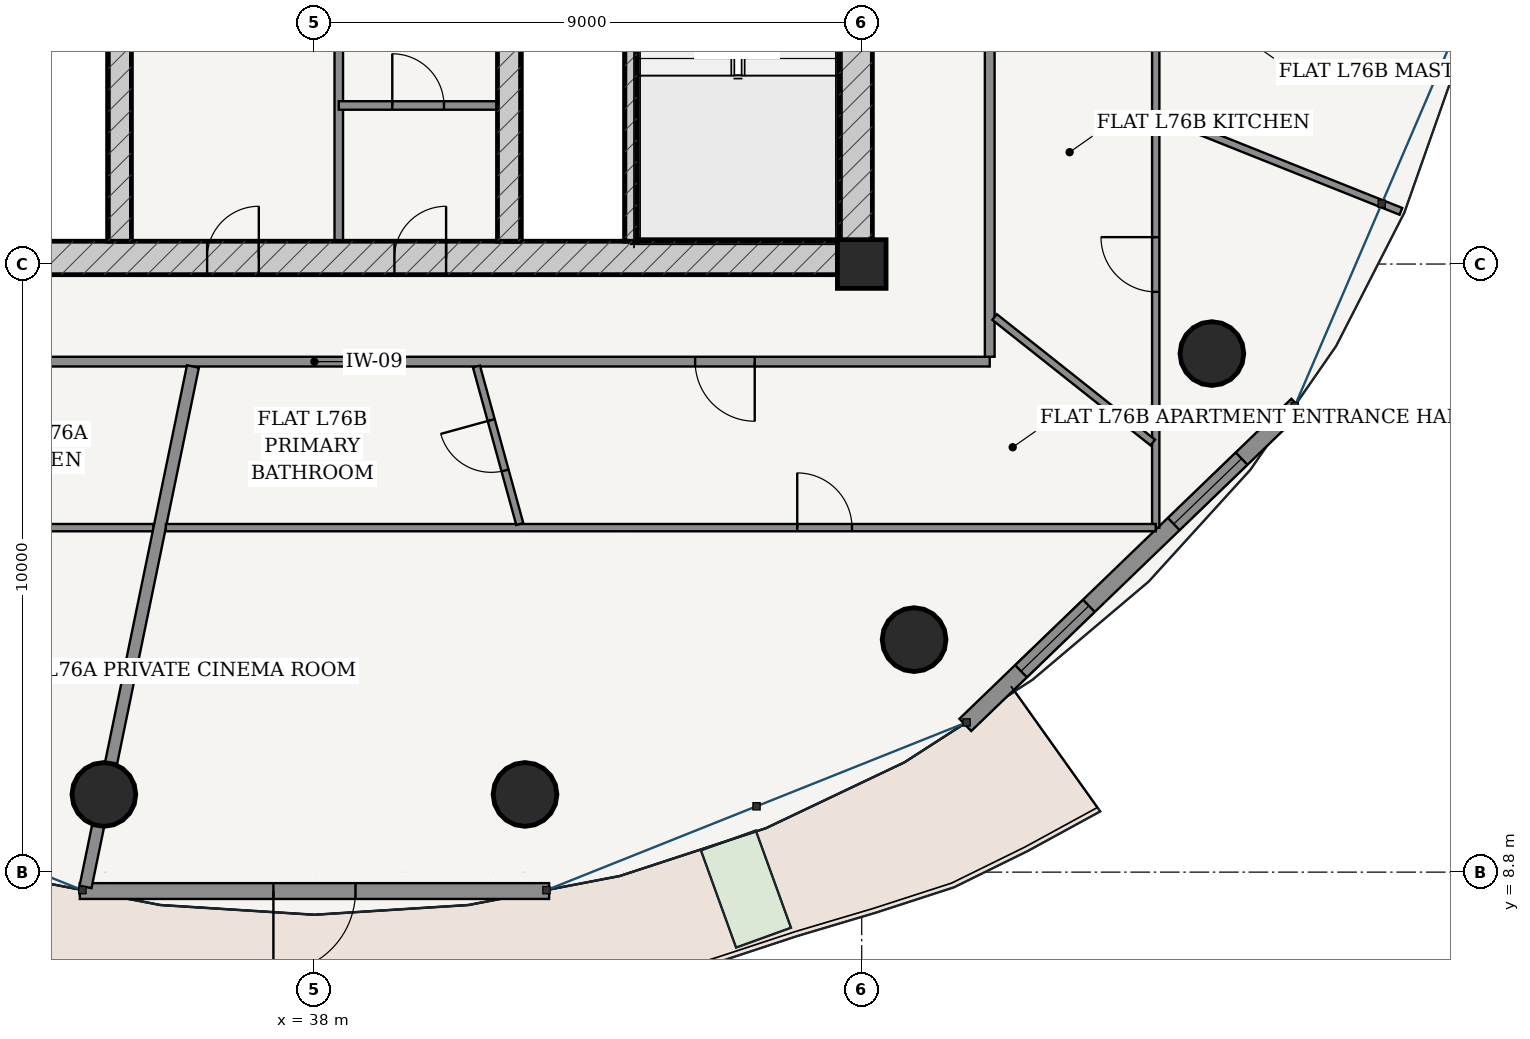
"""IFC4 building model, lengths in metres.
Left out: names, types, materials, properties, quantities, classifications, styles, units other than length and angle.
Written with IfcOpenShell. Run it as: python <this file> out.ifc"""

import sys

from ifc_helpers import new_model, si_unit, direction, frame, frame_2d, origin, origin_2d, place, context, subcontext, project, spatial, rectangle, hollow_circle, extrude, source, transform, mapped, element, fill, save


model = new_model("IFC4")
c1 = context("Model", 3, precision=1e-05, world=origin(), true_north=direction((-0.2419218956, 0.970295726276)))
c2 = subcontext(c1, "Body", "Model", "MODEL_VIEW")
j1 = project(units=[si_unit("LENGTHUNIT", "METRE"), si_unit("PLANEANGLEUNIT", "RADIAN")], contexts=[c1])
p1 = place(None, origin())
s1 = spatial("IfcSite", under=j1, at=p1, CompositionType="ELEMENT")
p2 = place(p1, origin())
s2 = spatial("IfcBuilding", under=s1, at=p2, CompositionType="ELEMENT")
p3 = place(p2, frame((0.0, 0.0, 289.45)))
s3 = spatial("IfcBuildingStorey", under=s2, at=p3, CompositionType="ELEMENT", Elevation=289.45)
p4 = place(p3, frame((47.0, 18.8, 0.0), z_axis=(0.0, 0.0, 1.0), x_axis=(1.0, 0.0, 0.0)))
e1 = element("IfcColumn", 1, at=p4, inside=s3, PredefinedType="COLUMN", context=c2, shape_type="SweptSolid", body=[
    extrude(rectangle(XDim=0.8, YDim=0.8, at=origin_2d()), origin(), (0.0, 0.0, 1.0), 3.75),
])
p5 = place(p3, frame((28.825, 18.9, 0.0), z_axis=(0.0, 0.0, 1.0), x_axis=(1.0, 0.0, 0.0)))
e2 = element("IfcWall", 2, at=p5, inside=s3, PredefinedType="SHEAR", context=c2, shape_type="SweptSolid", body=[
    extrude(rectangle(XDim=18.35, YDim=0.55, at=frame_2d((9.175, 0.0))), origin(), (0.0, 0.0, 1.0), 3.49),
])
p6 = place(p5, frame((7.41, 0.0, 0.0)))
e3 = element("IfcOpeningElement", 3, at=p6, cuts=e2, PredefinedType="OPENING", context=c2, shape_type="SweptSolid", body=[
    extrude(rectangle(XDim=0.85, YDim=2.1, at=frame_2d((0.425, 1.05))), frame((0.0, 0.285, 0.0), z_axis=(0.0, -1.0, 0.0), x_axis=(1.0, 0.0, 0.0)), (0.0, 0.0, 1.0), 0.57),
])
p7 = place(p5, frame((10.49, 0.0, 0.0)))
e4 = element("IfcOpeningElement", 4, at=p7, cuts=e2, PredefinedType="OPENING", context=c2, shape_type="SweptSolid", body=[
    extrude(rectangle(XDim=0.85, YDim=2.1, at=frame_2d((0.425, 1.05))), frame((0.0, 0.285, 0.0), z_axis=(0.0, -1.0, 0.0), x_axis=(1.0, 0.0, 0.0)), (0.0, 0.0, 1.0), 0.57),
])
p8 = place(p3, frame((46.9, 19.175, 0.0), z_axis=(0.0, 0.0, 1.0), x_axis=(0.0, 1.0, 0.0)))
e5 = element("IfcWall", 5, at=p8, inside=s3, PredefinedType="SHEAR", context=c2, shape_type="SweptSolid", body=[
    extrude(rectangle(XDim=15.25, YDim=0.55, at=frame_2d((7.625, 0.0))), origin(), (0.0, 0.0, 1.0), 3.49),
])
p9 = place(p8, frame((9.875, 0.0, 0.0)))
e6 = element("IfcOpeningElement", 6, at=p9, cuts=e5, PredefinedType="OPENING", context=c2, shape_type="SweptSolid", body=[
    extrude(rectangle(XDim=1.5, YDim=2.2, at=frame_2d((0.75, 1.1))), frame((0.0, 0.285, 0.0), z_axis=(0.0, -1.0, 0.0), x_axis=(1.0, 0.0, 0.0)), (0.0, 0.0, 1.0), 0.57),
])
p10 = place(p3, frame((43.205, 19.175, 0.0), z_axis=(0.0, 0.0, 1.0), x_axis=(0.0, 1.0, 0.0)))
e7 = element("IfcWall", 7, at=p10, inside=s3, PredefinedType="SOLIDWALL", context=c2, shape_type="SweptSolid", body=[
    extrude(rectangle(XDim=7.375, YDim=0.2, at=frame_2d((3.688, 0.0))), origin(), (0.0, 0.0, 1.0), 3.49),
])
p11 = place(p3, frame((34.8, 19.175, 0.0), z_axis=(0.0, 0.0, 1.0), x_axis=(0.0, 1.0, 0.0)))
e8 = element("IfcWall", 8, at=p11, inside=s3, PredefinedType="SHEAR", context=c2, shape_type="SweptSolid", body=[
    extrude(rectangle(XDim=15.25, YDim=0.38, at=frame_2d((7.625, 0.0))), origin(), (0.0, 0.0, 1.0), 3.49),
])
p12 = place(p11, frame((7.8, 0.0, 0.0)))
e9 = element("IfcOpeningElement", 9, at=p12, cuts=e8, PredefinedType="OPENING", context=c2, shape_type="SweptSolid", body=[
    extrude(rectangle(XDim=1.05, YDim=2.15, at=frame_2d((0.525, 1.075))), frame((0.0, 0.2, 0.0), z_axis=(0.0, -1.0, 0.0), x_axis=(1.0, 0.0, 0.0)), (0.0, 0.0, 1.0), 0.4),
])
p13 = place(p3, frame((41.2, 19.175, 0.0), z_axis=(0.0, 0.0, 1.0), x_axis=(0.0, 1.0, 0.0)))
e10 = element("IfcWall", 10, at=p13, inside=s3, PredefinedType="SHEAR", context=c2, shape_type="SweptSolid", body=[
    extrude(rectangle(XDim=15.25, YDim=0.38, at=frame_2d((7.625, 0.0))), origin(), (0.0, 0.0, 1.0), 3.49),
])
p14 = place(p13, frame((7.8, 0.0, 0.0)))
e11 = element("IfcOpeningElement", 11, at=p14, cuts=e10, PredefinedType="OPENING", context=c2, shape_type="SweptSolid", body=[
    extrude(rectangle(XDim=1.05, YDim=2.15, at=frame_2d((0.525, 1.075))), frame((0.0, 0.2, 0.0), z_axis=(0.0, -1.0, 0.0), x_axis=(1.0, 0.0, 0.0)), (0.0, 0.0, 1.0), 0.4),
])
for number, where, z_axis, x_axis in (
    (12, (34.537, 10.078, 0.0), (0.0, 0.0, 1.0), (1.0, 0.0, 0.0)),
    (13, (41.463, 10.078, 0.0), (0.0, 0.0, 1.0), (1.0, 0.0, 0.0)),
    (14, (47.861, 12.624, 0.0), (0.0, 0.0, 1.0), (1.0, 0.0, 0.0)),
    (15, (52.759, 17.328, 0.0), (0.0, 0.0, 1.0), (1.0, 0.0, 0.0)),
):
    element("IfcColumn", number, at=place(p3, frame(where, z_axis=z_axis, x_axis=x_axis)), inside=s3, PredefinedType="COLUMN", context=c2, shape_type="SweptSolid", body=[
        extrude(hollow_circle(Radius=0.525, WallThickness=0.035, at=origin_2d()), origin(), (0.0, 0.0, 1.0), 3.75),
    ])
p15 = place(p3, frame((34.141, 8.489, 0.0), z_axis=(0.0, 0.0, 1.0), x_axis=(1.0, 0.0, 0.0)))
e16 = element("IfcWall", 16, at=p15, inside=s3, PredefinedType="SOLIDWALL", context=c2, shape_type="SweptSolid", body=[
    extrude(rectangle(XDim=7.718, YDim=0.26, at=frame_2d((3.859, 0.0))), origin(), (0.0, 0.0, 1.0), 3.49),
])
p16 = place(p15, frame((3.184, 0.0, 0.0)))
e17 = element("IfcOpeningElement", 17, at=p16, cuts=e16, PredefinedType="OPENING", context=c2, shape_type="SweptSolid", body=[
    extrude(rectangle(XDim=1.35, YDim=2.2, at=frame_2d((0.675, 1.1))), frame((0.0, 0.14, 0.0), z_axis=(0.0, -1.0, 0.0), x_axis=(1.0, 0.0, 0.0)), (0.0, 0.0, 1.0), 0.28),
])
p17 = place(p3, frame((48.704, 11.221, 0.0), z_axis=(0.0, 0.0, 1.0), x_axis=(0.719995397366, 0.69397883813, 0.0)))
e18 = element("IfcWall", 18, at=p17, inside=s3, PredefinedType="SOLIDWALL", context=c2, shape_type="SweptSolid", body=[
    extrude(rectangle(XDim=7.582, YDim=0.28, at=frame_2d((3.791, 0.0))), origin(), (0.0, 0.0, 1.0), 3.49),
])
p18 = place(p17, frame((1.272, 0.0, 0.85)))
e19 = element("IfcOpeningElement", 19, at=p18, cuts=e18, PredefinedType="OPENING", context=c2, shape_type="SweptSolid", body=[
    extrude(rectangle(XDim=1.55, YDim=1.95, at=frame_2d((0.775, 0.975))), frame((0.0, 0.15, 0.0), z_axis=(0.0, -1.0, 0.0), x_axis=(1.0, 0.0, 0.0)), (0.0, 0.0, 1.0), 0.3),
])
p19 = place(p17, frame((4.76, 0.0, 0.85)))
e20 = element("IfcOpeningElement", 20, at=p19, cuts=e18, PredefinedType="OPENING", context=c2, shape_type="SweptSolid", body=[
    extrude(rectangle(XDim=1.55, YDim=1.95, at=frame_2d((0.775, 0.975))), frame((0.0, 0.15, 0.0), z_axis=(0.0, -1.0, 0.0), x_axis=(1.0, 0.0, 0.0)), (0.0, 0.0, 1.0), 0.3),
])
p20 = place(p3, frame((38.4, 19.175, 0.0), z_axis=(0.0, 0.0, 1.0), x_axis=(0.0, 1.0, 0.0)))
e21 = element("IfcWall", 21, at=p20, inside=s3, PredefinedType="PARTITIONING", context=c2, shape_type="SweptSolid", body=[
    extrude(rectangle(XDim=4.465, YDim=0.14, at=frame_2d((2.232, 0.0))), origin(), (0.0, 0.0, 1.0), 3.49),
])
p21 = place(p3, frame((38.4, 21.407, 0.0), z_axis=(0.0, 0.0, 1.0), x_axis=(1.0, 0.0, 0.0)))
e22 = element("IfcWall", 22, at=p21, inside=s3, PredefinedType="PARTITIONING", context=c2, shape_type="SweptSolid", body=[
    extrude(rectangle(XDim=2.61, YDim=0.14, at=frame_2d((1.305, 0.0))), origin(), (0.0, 0.0, 1.0), 3.49),
])
p22 = place(p21, frame((0.88, 0.0, 0.0)))
e23 = element("IfcOpeningElement", 23, at=p22, cuts=e22, PredefinedType="OPENING", context=c2, shape_type="SweptSolid", body=[
    extrude(rectangle(XDim=0.85, YDim=2.1, at=frame_2d((0.425, 1.05))), frame((0.0, 0.08, 0.0), z_axis=(0.0, -1.0, 0.0), x_axis=(1.0, 0.0, 0.0)), (0.0, 0.0, 1.0), 0.16),
])
p23 = place(p3, frame((26.895, 17.195, 0.0), z_axis=(0.0, 0.0, 1.0), x_axis=(1.0, 0.0, 0.0)))
e24 = element("IfcWall", 24, at=p23, inside=s3, PredefinedType="PARTITIONING", context=c2, shape_type="SweptSolid", body=[
    extrude(rectangle(XDim=22.21, YDim=0.16, at=frame_2d((11.105, 0.0))), origin(), (0.0, 0.0, 1.0), 3.015),
])
p24 = place(p23, frame((17.365, 0.0, 0.0)))
e25 = element("IfcOpeningElement", 25, at=p24, cuts=e24, PredefinedType="OPENING", context=c2, shape_type="SweptSolid", body=[
    extrude(rectangle(XDim=0.98, YDim=2.2, at=frame_2d((0.49, 1.1))), frame((0.0, 0.09, 0.0), z_axis=(0.0, -1.0, 0.0), x_axis=(1.0, 0.0, 0.0)), (0.0, 0.0, 1.0), 0.18),
])
p25 = place(p3, frame((49.105, 17.275, 0.0), z_axis=(0.0, 0.0, 1.0), x_axis=(0.0, 1.0, 0.0)))
e26 = element("IfcWall", 26, at=p25, inside=s3, PredefinedType="PARTITIONING", context=c2, shape_type="SweptSolid", body=[
    extrude(rectangle(XDim=13.925, YDim=0.16, at=frame_2d((6.962, 0.0))), origin(), (0.0, 0.0, 1.0), 3.015),
])
p26 = place(p3, frame((35.353, 14.465, 0.0), z_axis=(0.0, 0.0, 1.0), x_axis=(-1.0, 0.0, 0.0)))
e27 = element("IfcWall", 27, at=p26, inside=s3, PredefinedType="PARTITIONING", context=c2, shape_type="SweptSolid", body=[
    extrude(rectangle(XDim=11.188, YDim=0.12, at=frame_2d((5.594, 0.0))), origin(), (0.0, 0.0, 1.0), 3.015),
])
p27 = place(p26, frame((3.997, 0.0, 0.0)))
e28 = element("IfcOpeningElement", 28, at=p27, cuts=e27, PredefinedType="OPENING", context=c2, shape_type="SweptSolid", body=[
    extrude(rectangle(XDim=0.9, YDim=2.15, at=frame_2d((0.45, 1.075))), frame((0.0, 0.07, 0.0), z_axis=(0.0, -1.0, 0.0), x_axis=(1.0, 0.0, 0.0)), (0.0, 0.0, 1.0), 0.14),
])
p28 = place(p3, frame((36.001, 17.115, 0.0), z_axis=(0.0, 0.0, 1.0), x_axis=(-0.202108543081, -0.979363128167, 0.0)))
e29 = element("IfcWall", 29, at=p28, inside=s3, PredefinedType="PARTITIONING", context=c2, shape_type="SweptSolid", body=[
    extrude(rectangle(XDim=8.739, YDim=0.2, at=frame_2d((4.369, 0.0))), origin(), (0.0, 0.0, 1.0), 3.015),
])
p29 = place(p3, frame((51.835, 34.01, 0.0), z_axis=(0.0, 0.0, 1.0), x_axis=(0.0, -1.0, 0.0)))
e30 = element("IfcWall", 30, at=p29, inside=s3, PredefinedType="PARTITIONING", context=c2, shape_type="SweptSolid", body=[
    extrude(rectangle(XDim=19.545, YDim=0.12, at=frame_2d((9.772, 0.0))), origin(), (0.0, 0.0, 1.0), 3.015),
])
p30 = place(p29, frame((14.768, 0.0, 0.0)))
e31 = element("IfcOpeningElement", 31, at=p30, cuts=e30, PredefinedType="OPENING", context=c2, shape_type="SweptSolid", body=[
    extrude(rectangle(XDim=0.9, YDim=2.15, at=frame_2d((0.45, 1.075))), frame((0.0, 0.07, 0.0), z_axis=(0.0, -1.0, 0.0), x_axis=(1.0, 0.0, 0.0)), (0.0, 0.0, 1.0), 0.14),
])
p31 = place(p29, frame((8.718, 0.0, 0.0)))
e32 = element("IfcOpeningElement", 32, at=p31, cuts=e30, PredefinedType="OPENING", context=c2, shape_type="SweptSolid", body=[
    extrude(rectangle(XDim=0.9, YDim=2.15, at=frame_2d((0.45, 1.075))), frame((0.0, 0.07, 0.0), z_axis=(0.0, -1.0, 0.0), x_axis=(1.0, 0.0, 0.0)), (0.0, 0.0, 1.0), 0.14),
])
p32 = place(p29, frame((4.14, 0.0, 0.0)))
e33 = element("IfcOpeningElement", 33, at=p32, cuts=e30, PredefinedType="OPENING", context=c2, shape_type="SweptSolid", body=[
    extrude(rectangle(XDim=0.9, YDim=2.15, at=frame_2d((0.45, 1.075))), frame((0.0, 0.07, 0.0), z_axis=(0.0, -1.0, 0.0), x_axis=(1.0, 0.0, 0.0)), (0.0, 0.0, 1.0), 0.14),
])
p33 = place(p3, frame((51.835, 14.465, 0.0), z_axis=(0.0, 0.0, 1.0), x_axis=(-1.0, 0.0, 0.0)))
e34 = element("IfcWall", 34, at=p33, inside=s3, PredefinedType="PARTITIONING", context=c2, shape_type="SweptSolid", body=[
    extrude(rectangle(XDim=16.278, YDim=0.12, at=frame_2d((8.139, 0.0))), origin(), (0.0, 0.0, 1.0), 3.015),
])
p34 = place(p33, frame((4.996, 0.0, 0.0)))
e35 = element("IfcOpeningElement", 35, at=p34, cuts=e34, PredefinedType="OPENING", context=c2, shape_type="SweptSolid", body=[
    extrude(rectangle(XDim=0.9, YDim=2.15, at=frame_2d((0.45, 1.075))), frame((0.0, 0.07, 0.0), z_axis=(0.0, -1.0, 0.0), x_axis=(1.0, 0.0, 0.0)), (0.0, 0.0, 1.0), 0.14),
])
p35 = place(p3, frame((51.893, 21.253, 0.0), z_axis=(0.0, 0.0, 1.0), x_axis=(0.928712556691, -0.370800467966, 0.0)))
e36 = element("IfcWall", 36, at=p35, inside=s3, PredefinedType="PARTITIONING", context=c2, shape_type="SweptSolid", body=[
    extrude(rectangle(XDim=4.28, YDim=0.12, at=frame_2d((2.14, 0.0))), origin(), (0.0, 0.0, 1.0), 3.121),
])
p36 = place(p3, frame((40.664, 17.115, 0.0), z_axis=(0.0, 0.0, 1.0), x_axis=(0.265177604745, -0.964199584081, 0.0)))
e37 = element("IfcWall", 37, at=p36, inside=s3, PredefinedType="PARTITIONING", context=c2, shape_type="SweptSolid", body=[
    extrude(rectangle(XDim=2.687, YDim=0.12, at=frame_2d((1.343, 0.0))), origin(), (0.0, 0.0, 1.0), 3.209),
])
p37 = place(p36, frame((0.913, 0.0, 0.0)))
e38 = element("IfcOpeningElement", 38, at=p37, cuts=e37, PredefinedType="OPENING", context=c2, shape_type="SweptSolid", body=[
    extrude(rectangle(XDim=0.86, YDim=2.15, at=frame_2d((0.43, 1.075))), frame((0.0, 0.07, 0.0), z_axis=(0.0, -1.0, 0.0), x_axis=(1.0, 0.0, 0.0)), (0.0, 0.0, 1.0), 0.14),
])
p38 = place(p3, frame((49.185, 17.928, 0.0), z_axis=(0.0, 0.0, 1.0), x_axis=(0.78348039615, -0.621416501912, 0.0)))
e39 = element("IfcWall", 39, at=p38, inside=s3, PredefinedType="PARTITIONING", context=c2, shape_type="SweptSolid", body=[
    extrude(rectangle(XDim=3.32, YDim=0.12, at=frame_2d((1.66, 0.0))), origin(), (0.0, 0.0, 1.0), 3.121),
])
m1 = source(origin(), c2, "Body", "SweptSolid", [
    extrude(rectangle(XDim=1.35, YDim=2.2, at=frame_2d((0.675, 1.1))), frame((0.0, 0.025, 0.0), z_axis=(0.0, -1.0, 0.0), x_axis=(1.0, 0.0, 0.0)), (0.0, 0.0, 1.0), 0.05),
])
p39 = place(p16, frame((1.35, 0.0, 0.0), z_axis=(0.0, 0.0, 1.0), x_axis=(-1.0, 0.0, 0.0)))
e40 = element("IfcDoor", 40, at=p39, inside=s3, OperationType="SINGLE_SWING_RIGHT", PredefinedType="DOOR", context=c2, shape_type="MappedRepresentation", body=[
    mapped(m1, transform((0.0, 0.0, 0.0), scale=1.0)),
])
fill(e17, e40)
m2 = source(origin(), c2, "Body", "SweptSolid", [
    extrude(rectangle(XDim=1.55, YDim=1.95, at=frame_2d((0.775, 0.975))), frame((0.0, 0.03, 0.0), z_axis=(0.0, -1.0, 0.0), x_axis=(1.0, 0.0, 0.0)), (0.0, 0.0, 1.0), 0.06),
])
p40 = place(p18, origin())
e41 = element("IfcWindow", 41, at=p40, inside=s3, PartitioningType="SINGLE_PANEL", PredefinedType="WINDOW", context=c2, shape_type="MappedRepresentation", body=[
    mapped(m2, transform((0.0, 0.0, 0.0), scale=1.0)),
])
fill(e19, e41)
p41 = place(p19, origin())
e42 = element("IfcWindow", 42, at=p41, inside=s3, PartitioningType="SINGLE_PANEL", PredefinedType="WINDOW", context=c2, shape_type="MappedRepresentation", body=[
    mapped(m2, transform((0.0, 0.0, 0.0), scale=1.0)),
])
fill(e20, e42)
m3 = source(origin(), c2, "Body", "SweptSolid", [
    extrude(rectangle(XDim=0.85, YDim=2.1, at=frame_2d((0.425, 1.05))), frame((0.0, 0.025, 0.0), z_axis=(0.0, -1.0, 0.0), x_axis=(1.0, 0.0, 0.0)), (0.0, 0.0, 1.0), 0.05),
])
p42 = place(p6, origin())
e43 = element("IfcDoor", 43, at=p42, inside=s3, OperationType="SINGLE_SWING_RIGHT", PredefinedType="DOOR", context=c2, shape_type="MappedRepresentation", body=[
    mapped(m3, transform((0.0, 0.0, 0.0), scale=1.0)),
])
fill(e3, e43)
p43 = place(p7, origin())
e44 = element("IfcDoor", 44, at=p43, inside=s3, OperationType="SINGLE_SWING_RIGHT", PredefinedType="DOOR", context=c2, shape_type="MappedRepresentation", body=[
    mapped(m3, transform((0.0, 0.0, 0.0), scale=1.0)),
])
fill(e4, e44)
p44 = place(p22, origin())
e45 = element("IfcDoor", 45, at=p44, inside=s3, OperationType="SINGLE_SWING_LEFT", PredefinedType="DOOR", context=c2, shape_type="MappedRepresentation", body=[
    mapped(m3, transform((0.0, 0.0, 0.0), scale=1.0)),
])
fill(e23, e45)
m4 = source(origin(), c2, "Body", "SweptSolid", [
    extrude(rectangle(XDim=0.98, YDim=2.2, at=frame_2d((0.49, 1.1))), frame((0.0, 0.025, 0.0), z_axis=(0.0, -1.0, 0.0), x_axis=(1.0, 0.0, 0.0)), (0.0, 0.0, 1.0), 0.05),
])
p45 = place(p24, frame((0.98, 0.0, 0.0), z_axis=(0.0, 0.0, 1.0), x_axis=(-1.0, 0.0, 0.0)))
e46 = element("IfcDoor", 46, at=p45, inside=s3, OperationType="SINGLE_SWING_LEFT", PredefinedType="DOOR", context=c2, shape_type="MappedRepresentation", body=[
    mapped(m4, transform((0.0, 0.0, 0.0), scale=1.0)),
])
fill(e25, e46)
m5 = source(origin(), c2, "Body", "SweptSolid", [
    extrude(rectangle(XDim=0.86, YDim=2.15, at=frame_2d((0.43, 1.075))), frame((0.0, 0.025, 0.0), z_axis=(0.0, -1.0, 0.0), x_axis=(1.0, 0.0, 0.0)), (0.0, 0.0, 1.0), 0.05),
])
p46 = place(p37, frame((0.86, 0.0, 0.0), z_axis=(0.0, 0.0, 1.0), x_axis=(-1.0, 0.0, 0.0)))
e47 = element("IfcDoor", 47, at=p46, inside=s3, OperationType="SINGLE_SWING_RIGHT", PredefinedType="DOOR", context=c2, shape_type="MappedRepresentation", body=[
    mapped(m5, transform((0.0, 0.0, 0.0), scale=1.0)),
])
fill(e38, e47)
m6 = source(origin(), c2, "Body", "SweptSolid", [
    extrude(rectangle(XDim=0.9, YDim=2.15, at=frame_2d((0.45, 1.075))), frame((0.0, 0.025, 0.0), z_axis=(0.0, -1.0, 0.0), x_axis=(1.0, 0.0, 0.0)), (0.0, 0.0, 1.0), 0.05),
])
p47 = place(p34, frame((0.9, 0.0, 0.0), z_axis=(0.0, 0.0, 1.0), x_axis=(-1.0, 0.0, 0.0)))
e48 = element("IfcDoor", 48, at=p47, inside=s3, OperationType="SINGLE_SWING_LEFT", PredefinedType="DOOR", context=c2, shape_type="MappedRepresentation", body=[
    mapped(m6, transform((0.0, 0.0, 0.0), scale=1.0)),
])
fill(e35, e48)
p48 = place(p30, frame((0.9, 0.0, 0.0), z_axis=(0.0, 0.0, 1.0), x_axis=(-1.0, 0.0, 0.0)))
e49 = element("IfcDoor", 49, at=p48, inside=s3, OperationType="SINGLE_SWING_RIGHT", PredefinedType="DOOR", context=c2, shape_type="MappedRepresentation", body=[
    mapped(m6, transform((0.0, 0.0, 0.0), scale=1.0)),
])
fill(e31, e49)
save(model, sys.argv[1])
